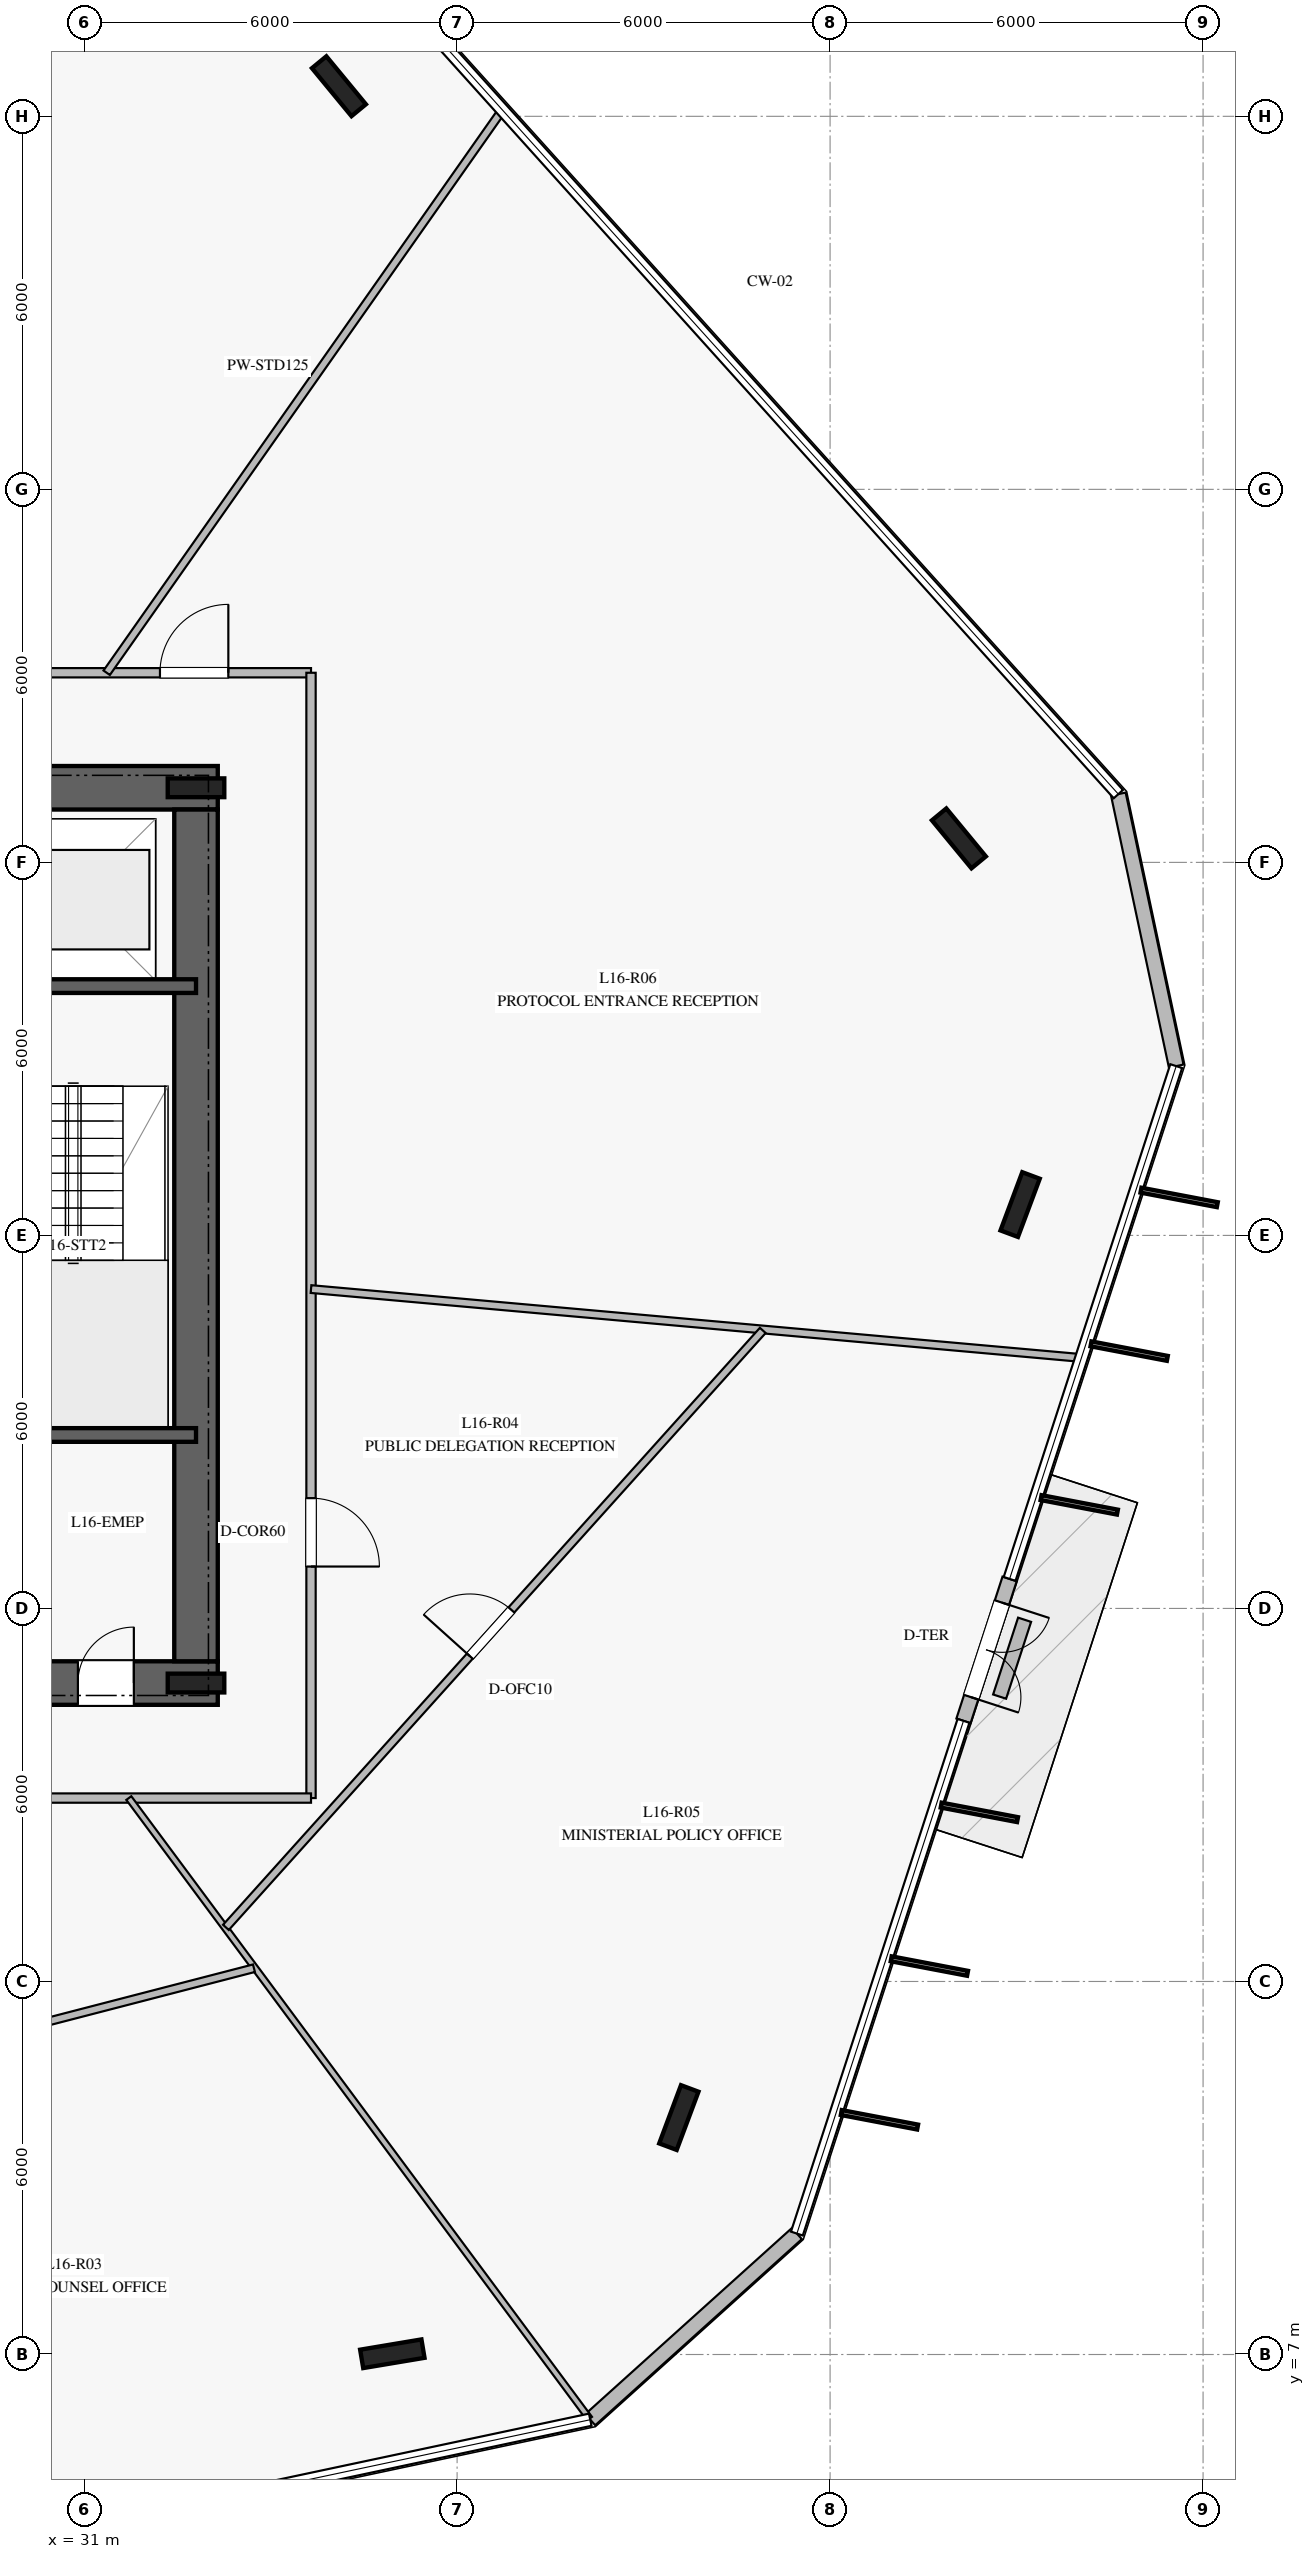
"""IFC4 building model, lengths in metres.
Left out: names, types, materials, properties, quantities, classifications, styles, units other than length and angle.
Written with IfcOpenShell. Run it as: python <this file> out.ifc"""

import sys

from ifc_helpers import new_model, si_unit, direction, frame, frame_2d, origin, origin_2d, place, context, subcontext, project, spatial, rectangle, i_section, extrude, element, fill, save


model = new_model("IFC4")
c1 = context("Model", 3, precision=1e-05, world=origin(), true_north=direction((0.0, 1.0)))
c2 = subcontext(c1, "Body", "Model", "MODEL_VIEW")
j1 = project(units=[si_unit("LENGTHUNIT", "METRE"), si_unit("PLANEANGLEUNIT", "RADIAN")], contexts=[c1])
p1 = place(None, origin())
s1 = spatial("IfcSite", under=j1, at=p1, CompositionType="ELEMENT")
p2 = place(p1, origin())
s2 = spatial("IfcBuilding", under=s1, at=p2, CompositionType="ELEMENT")
p3 = place(p2, frame((0.0, 0.0, 68.0)))
s3 = spatial("IfcBuildingStorey", under=s2, at=p3, CompositionType="ELEMENT", Elevation=68.0)
p4 = place(p3, frame((16.85, 17.8, 0.0), z_axis=(0.0, 0.0, 1.0), x_axis=(1.0, 0.0, 0.0)))
e1 = element("IfcWall", 1, at=p4, inside=s3, PredefinedType="SHEAR", context=c2, shape_type="SweptSolid", body=[
    extrude(rectangle(XDim=16.3, YDim=0.7, at=frame_2d((8.15, 0.0))), origin(), (0.0, 0.0, 1.0), 3.76),
])
p5 = place(p4, frame((5.1, 0.0, 0.0)))
e2 = element("IfcOpeningElement", 2, at=p5, cuts=e1, PredefinedType="OPENING", context=c2, shape_type="SweptSolid", body=[
    extrude(rectangle(XDim=1.2, YDim=2.25, at=frame_2d((0.6, 1.125))), frame((0.0, 0.36, 0.0), z_axis=(0.0, -1.0, 0.0), x_axis=(1.0, 0.0, 0.0)), (0.0, 0.0, 1.0), 0.72),
])
p6 = place(p4, frame((14.05, 0.0, 0.0)))
e3 = element("IfcOpeningElement", 3, at=p6, cuts=e1, PredefinedType="OPENING", context=c2, shape_type="SweptSolid", body=[
    extrude(rectangle(XDim=0.9, YDim=2.1, at=frame_2d((0.45, 1.05))), frame((0.0, 0.36, 0.0), z_axis=(0.0, -1.0, 0.0), x_axis=(1.0, 0.0, 0.0)), (0.0, 0.0, 1.0), 0.72),
])
p7 = place(p4, frame((7.95, 0.0, 0.0)))
e4 = element("IfcOpeningElement", 4, at=p7, cuts=e1, PredefinedType="OPENING", context=c2, shape_type="SweptSolid", body=[
    extrude(rectangle(XDim=1.1, YDim=2.2, at=frame_2d((0.55, 1.1))), frame((0.0, 0.36, 0.0), z_axis=(0.0, -1.0, 0.0), x_axis=(1.0, 0.0, 0.0)), (0.0, 0.0, 1.0), 0.72),
])
p8 = place(p4, frame((9.925, 0.0, 0.0)))
e5 = element("IfcOpeningElement", 5, at=p8, cuts=e1, PredefinedType="OPENING", context=c2, shape_type="SweptSolid", body=[
    extrude(rectangle(XDim=1.1, YDim=2.2, at=frame_2d((0.55, 1.1))), frame((0.0, 0.36, 0.0), z_axis=(0.0, -1.0, 0.0), x_axis=(1.0, 0.0, 0.0)), (0.0, 0.0, 1.0), 0.72),
])
p9 = place(p4, frame((11.9, 0.0, 0.0)))
e6 = element("IfcOpeningElement", 6, at=p9, cuts=e1, PredefinedType="OPENING", context=c2, shape_type="SweptSolid", body=[
    extrude(rectangle(XDim=1.1, YDim=2.2, at=frame_2d((0.55, 1.1))), frame((0.0, 0.36, 0.0), z_axis=(0.0, -1.0, 0.0), x_axis=(1.0, 0.0, 0.0)), (0.0, 0.0, 1.0), 0.72),
])
p10 = place(p3, frame((33.15, 32.2, 0.0), z_axis=(0.0, 0.0, 1.0), x_axis=(-1.0, 0.0, 0.0)))
e7 = element("IfcWall", 7, at=p10, inside=s3, PredefinedType="SHEAR", context=c2, shape_type="SweptSolid", body=[
    extrude(rectangle(XDim=16.3, YDim=0.7, at=frame_2d((8.15, 0.0))), origin(), (0.0, 0.0, 1.0), 3.76),
])
p11 = place(p10, frame((5.1, 0.0, 0.0)))
e8 = element("IfcOpeningElement", 8, at=p11, cuts=e7, PredefinedType="OPENING", context=c2, shape_type="SweptSolid", body=[
    extrude(rectangle(XDim=1.2, YDim=2.25, at=frame_2d((0.6, 1.125))), frame((0.0, 0.36, 0.0), z_axis=(0.0, -1.0, 0.0), x_axis=(1.0, 0.0, 0.0)), (0.0, 0.0, 1.0), 0.72),
])
p12 = place(p3, frame((32.8, 18.15, 0.0), z_axis=(0.0, 0.0, 1.0), x_axis=(0.0, 1.0, 0.0)))
e9 = element("IfcWall", 9, at=p12, inside=s3, PredefinedType="SHEAR", context=c2, shape_type="SweptSolid", body=[
    extrude(rectangle(XDim=13.7, YDim=0.7, at=frame_2d((6.85, 0.0))), origin(), (0.0, 0.0, 1.0), 3.76),
])
for number, where, z_axis, x_axis in (
    (10, (32.8, 17.8, 0.0), (0.0, 0.0, 1.0), (1.0, 0.0, 0.0)),
    (11, (32.8, 32.2, 0.0), (0.0, 0.0, 1.0), (1.0, 0.0, 0.0)),
):
    element("IfcColumn", number, at=place(p3, frame(where, z_axis=z_axis, x_axis=x_axis)), inside=s3, PredefinedType="COLUMN", context=c2, shape_type="SweptSolid", body=[
        extrude(i_section(OverallWidth=0.302, OverallDepth=0.91, WebThickness=0.021, FlangeThickness=0.04, at=origin_2d()), origin(), (0.0, 0.0, 1.0), 4.0),
    ])
for number, where, z_axis, x_axis in (
    (12, (29.08, 21.79, 0.0), (0.0, 0.0, 1.0), (1.0, 0.0, 0.0)),
    (13, (29.08, 29.01, 0.0), (0.0, 0.0, 1.0), (1.0, 0.0, 0.0)),
):
    element("IfcWall", number, at=place(p3, frame(where, z_axis=z_axis, x_axis=x_axis)), inside=s3, PredefinedType="SOLIDWALL", context=c2, shape_type="SweptSolid", body=[
        extrude(rectangle(XDim=3.72, YDim=0.22, at=frame_2d((1.86, 0.0))), origin(), (0.0, 0.0, 1.0), 3.76),
    ])
for number, where, z_axis, x_axis in (
    (14, (45.072, 31.386, 0.0), (0.0, 0.0, 1.0), (-0.636, 0.772, 0.0)),
    (15, (35.099, 43.484, 0.0), (0.0, 0.0, 1.0), (-0.636, 0.772, 0.0)),
    (16, (35.958, 7.012, 0.0), (0.0, 0.0, 1.0), (0.986, 0.165, 0.0)),
    (17, (40.567, 10.811, 0.0), (0.0, 0.0, 1.0), (0.35, 0.937, 0.0)),
    (18, (46.057, 25.496, 0.0), (0.0, 0.0, 1.0), (0.35, 0.937, 0.0)),
):
    element("IfcColumn", number, at=place(p3, frame(where, z_axis=z_axis, x_axis=x_axis)), inside=s3, PredefinedType="COLUMN", context=c2, shape_type="SweptSolid", body=[
        extrude(i_section(OverallWidth=0.3, OverallDepth=1.0, WebThickness=0.019, FlangeThickness=0.036, at=origin_2d()), origin(), (0.0, 0.0, 1.0), 4.0),
    ])
p13 = place(p3, frame((39.142, 5.951, 0.0), z_axis=(0.0, 0.0, 1.0), x_axis=(0.743009154356, 0.669281253692, 0.0)))
e19 = element("IfcWall", 19, at=p13, inside=s3, PredefinedType="STANDARD", context=c2, shape_type="SweptSolid", body=[
    extrude(rectangle(XDim=4.474, YDim=0.24, at=frame_2d((2.237, 0.0))), origin(), (0.0, 0.0, 1.0), 3.76),
])
p14 = place(p3, frame((45.146, 17.192, 0.0), z_axis=(0.0, 0.0, 1.0), x_axis=(0.309049280464, 0.951046025303, 0.0)))
e20 = element("IfcWall", 20, at=p14, inside=s3, PredefinedType="STANDARD", context=c2, shape_type="SweptSolid", body=[
    extrude(rectangle(XDim=2.401, YDim=0.24, at=frame_2d((1.2, 0.0))), origin(), (0.0, 0.0, 1.0), 3.76),
])
p15 = place(p14, frame((0.4, 0.0, 0.0)))
e21 = element("IfcOpeningElement", 21, at=p15, cuts=e20, PredefinedType="OPENING", context=c2, shape_type="SweptSolid", body=[
    extrude(rectangle(XDim=1.6, YDim=2.25, at=frame_2d((0.8, 1.125))), frame((0.0, 0.13, 0.0), z_axis=(0.0, -1.0, 0.0), x_axis=(1.0, 0.0, 0.0)), (0.0, 0.0, 1.0), 0.26),
])
p16 = place(p3, frame((48.568, 27.723, 0.0), z_axis=(0.0, 0.0, 1.0), x_axis=(-0.20817208226, 0.978092216597, 0.0)))
e22 = element("IfcWall", 22, at=p16, inside=s3, PredefinedType="STANDARD", context=c2, shape_type="SweptSolid", body=[
    extrude(rectangle(XDim=4.473, YDim=0.24, at=frame_2d((2.236, 0.0))), origin(), (0.0, 0.0, 1.0), 3.76),
])
p17 = place(p3, frame((45.727, 17.582, 0.0), z_axis=(0.0, 0.0, 1.0), x_axis=(0.309175263073, 0.951005077118, 0.0)))
e23 = element("IfcWall", 23, at=p17, inside=s3, PredefinedType="USERDEFINED", context=c2, shape_type="SweptSolid", body=[
    extrude(rectangle(XDim=1.3, YDim=0.22, at=frame_2d((0.65, 0.0))), origin(), (0.0, 0.0, 1.0), 0.4),
])
p18 = place(p3, frame((15.35, 34.05, 0.0), z_axis=(0.0, 0.0, 1.0), x_axis=(1.0, 0.0, 0.0)))
e24 = element("IfcWall", 24, at=p18, inside=s3, PredefinedType="PARTITIONING", context=c2, shape_type="SweptSolid", body=[
    extrude(rectangle(XDim=19.3, YDim=0.15, at=frame_2d((9.65, 0.0))), origin(), (0.0, 0.0, 1.0), 3.21),
])
p19 = place(p18, frame((16.87, 0.0, 0.0)))
e25 = element("IfcOpeningElement", 25, at=p19, cuts=e24, PredefinedType="OPENING", context=c2, shape_type="SweptSolid", body=[
    extrude(rectangle(XDim=1.1, YDim=2.2, at=frame_2d((0.55, 1.1))), frame((0.0, 0.085, 0.0), z_axis=(0.0, -1.0, 0.0), x_axis=(1.0, 0.0, 0.0)), (0.0, 0.0, 1.0), 0.17),
])
p20 = place(p18, frame((11.431, 0.0, 0.0)))
e26 = element("IfcOpeningElement", 26, at=p20, cuts=e24, PredefinedType="OPENING", context=c2, shape_type="SweptSolid", body=[
    extrude(rectangle(XDim=1.1, YDim=2.2, at=frame_2d((0.55, 1.1))), frame((0.0, 0.085, 0.0), z_axis=(0.0, -1.0, 0.0), x_axis=(1.0, 0.0, 0.0)), (0.0, 0.0, 1.0), 0.17),
])
p21 = place(p18, frame((3.579, 0.0, 0.0)))
e27 = element("IfcOpeningElement", 27, at=p21, cuts=e24, PredefinedType="OPENING", context=c2, shape_type="SweptSolid", body=[
    extrude(rectangle(XDim=1.1, YDim=2.2, at=frame_2d((0.55, 1.1))), frame((0.0, 0.085, 0.0), z_axis=(0.0, -1.0, 0.0), x_axis=(1.0, 0.0, 0.0)), (0.0, 0.0, 1.0), 0.17),
])
p22 = place(p3, frame((34.65, 34.05, 0.0), z_axis=(0.0, 0.0, 1.0), x_axis=(0.0, -1.0, 0.0)))
e28 = element("IfcWall", 28, at=p22, inside=s3, PredefinedType="PARTITIONING", context=c2, shape_type="SweptSolid", body=[
    extrude(rectangle(XDim=18.1, YDim=0.15, at=frame_2d((9.05, 0.0))), origin(), (0.0, 0.0, 1.0), 3.21),
])
p23 = place(p22, frame((13.276, 0.0, 0.0)))
e29 = element("IfcOpeningElement", 29, at=p23, cuts=e28, PredefinedType="OPENING", context=c2, shape_type="SweptSolid", body=[
    extrude(rectangle(XDim=1.1, YDim=2.2, at=frame_2d((0.55, 1.1))), frame((0.0, 0.085, 0.0), z_axis=(0.0, -1.0, 0.0), x_axis=(1.0, 0.0, 0.0)), (0.0, 0.0, 1.0), 0.17),
])
p24 = place(p3, frame((34.65, 15.95, 0.0), z_axis=(0.0, 0.0, 1.0), x_axis=(-1.0, 0.0, 0.0)))
e30 = element("IfcWall", 30, at=p24, inside=s3, PredefinedType="PARTITIONING", context=c2, shape_type="SweptSolid", body=[
    extrude(rectangle(XDim=19.3, YDim=0.15, at=frame_2d((9.65, 0.0))), origin(), (0.0, 0.0, 1.0), 3.21),
])
p25 = place(p24, frame((14.672, 0.0, 0.0)))
e31 = element("IfcOpeningElement", 31, at=p25, cuts=e30, PredefinedType="OPENING", context=c2, shape_type="SweptSolid", body=[
    extrude(rectangle(XDim=1.1, YDim=2.2, at=frame_2d((0.55, 1.1))), frame((0.0, 0.085, 0.0), z_axis=(0.0, -1.0, 0.0), x_axis=(1.0, 0.0, 0.0)), (0.0, 0.0, 1.0), 0.17),
])
p26 = place(p24, frame((6.728, 0.0, 0.0)))
e32 = element("IfcOpeningElement", 32, at=p26, cuts=e30, PredefinedType="OPENING", context=c2, shape_type="SweptSolid", body=[
    extrude(rectangle(XDim=1.1, YDim=2.2, at=frame_2d((0.55, 1.1))), frame((0.0, 0.085, 0.0), z_axis=(0.0, -1.0, 0.0), x_axis=(1.0, 0.0, 0.0)), (0.0, 0.0, 1.0), 0.17),
])
p27 = place(p3, frame((31.363, 34.05, 0.0), z_axis=(0.0, 0.0, 1.0), x_axis=(0.575191769802, 0.818018598782, 0.0)))
e33 = element("IfcWall", 33, at=p27, inside=s3, PredefinedType="PARTITIONING", context=c2, shape_type="SweptSolid", body=[
    extrude(rectangle(XDim=11.048, YDim=0.125, at=frame_2d((5.524, 0.0))), origin(), (0.0, 0.0, 1.0), 3.05),
])
p28 = place(p3, frame((31.719, 15.95, 0.0), z_axis=(0.0, 0.0, 1.0), x_axis=(0.596065473306, -0.802935832762, 0.0)))
e34 = element("IfcWall", 34, at=p28, inside=s3, PredefinedType="MOVABLE", context=c2, shape_type="SweptSolid", body=[
    extrude(rectangle(XDim=12.433, YDim=0.1, at=frame_2d((6.217, 0.0))), origin(), (0.0, 0.0, 1.0), 3.06),
])
p29 = place(p3, frame((34.65, 24.137, 0.0), z_axis=(0.0, 0.0, 1.0), x_axis=(0.996022646165, -0.089100439541, 0.0)))
e35 = element("IfcWall", 35, at=p29, inside=s3, PredefinedType="PARTITIONING", context=c2, shape_type="SweptSolid", body=[
    extrude(rectangle(XDim=12.423, YDim=0.125, at=frame_2d((6.212, 0.0))), origin(), (0.0, 0.0, 1.0), 3.06),
])
p30 = place(p3, frame((21.686, 10.093, 0.0), z_axis=(0.0, 0.0, 1.0), x_axis=(0.968058125552, 0.250725877309, 0.0)))
e36 = element("IfcWall", 36, at=p30, inside=s3, PredefinedType="PARTITIONING", context=c2, shape_type="SweptSolid", body=[
    extrude(rectangle(XDim=12.443, YDim=0.125, at=frame_2d((6.222, 0.0))), origin(), (0.0, 0.0, 1.0), 3.76),
])
p31 = place(p30, frame((5.722, 0.0, 0.0)))
e37 = element("IfcOpeningElement", 37, at=p31, cuts=e36, PredefinedType="OPENING", context=c2, shape_type="SweptSolid", body=[
    extrude(rectangle(XDim=1.0, YDim=2.15, at=frame_2d((0.5, 1.075))), frame((0.0, 0.073, 0.0), z_axis=(0.0, -1.0, 0.0), x_axis=(1.0, 0.0, 0.0)), (0.0, 0.0, 1.0), 0.145),
])
p32 = place(p3, frame((33.281, 13.87, 0.0), z_axis=(0.0, 0.0, 1.0), x_axis=(0.668723423756, 0.74351125245, 0.0)))
e38 = element("IfcWall", 38, at=p32, inside=s3, PredefinedType="PARTITIONING", context=c2, shape_type="SweptSolid", body=[
    extrude(rectangle(XDim=12.914, YDim=0.125, at=frame_2d((6.457, 0.0))), origin(), (0.0, 0.0, 1.0), 3.21),
])
p33 = place(p32, frame((5.868, 0.0, 0.0)))
e39 = element("IfcOpeningElement", 39, at=p33, cuts=e38, PredefinedType="OPENING", context=c2, shape_type="SweptSolid", body=[
    extrude(rectangle(XDim=1.0, YDim=2.15, at=frame_2d((0.5, 1.075))), frame((0.0, 0.073, 0.0), z_axis=(0.0, -1.0, 0.0), x_axis=(1.0, 0.0, 0.0)), (0.0, 0.0, 1.0), 0.145),
])
p34 = place(p15, frame((1.6, 0.0, 0.0), z_axis=(0.0, 0.0, 1.0), x_axis=(-1.0, 0.0, 0.0)))
e40 = element("IfcDoor", 40, at=p34, inside=s3, OperationType="DOUBLE_DOOR_SINGLE_SWING", PredefinedType="DOOR", context=c2, shape_type="SweptSolid", body=[
    extrude(rectangle(XDim=1.6, YDim=2.25, at=frame_2d((0.8, 1.125))), frame((0.0, 0.025, 0.0), z_axis=(0.0, -1.0, 0.0), x_axis=(1.0, 0.0, 0.0)), (0.0, 0.0, 1.0), 0.05),
])
fill(e21, e40)
p35 = place(p6, origin())
e41 = element("IfcDoor", 41, at=p35, inside=s3, OperationType="SINGLE_SWING_RIGHT", PredefinedType="DOOR", context=c2, shape_type="SweptSolid", body=[
    extrude(rectangle(XDim=0.9, YDim=2.1, at=frame_2d((0.45, 1.05))), frame((0.0, 0.025, 0.0), z_axis=(0.0, -1.0, 0.0), x_axis=(1.0, 0.0, 0.0)), (0.0, 0.0, 1.0), 0.05),
])
fill(e3, e41)
p36 = place(p23, origin())
e42 = element("IfcDoor", 42, at=p36, inside=s3, OperationType="SINGLE_SWING_RIGHT", PredefinedType="DOOR", context=c2, shape_type="SweptSolid", body=[
    extrude(rectangle(XDim=1.1, YDim=2.2, at=frame_2d((0.55, 1.1))), frame((0.0, 0.025, 0.0), z_axis=(0.0, -1.0, 0.0), x_axis=(1.0, 0.0, 0.0)), (0.0, 0.0, 1.0), 0.05),
])
fill(e29, e42)
p37 = place(p33, origin())
e43 = element("IfcDoor", 43, at=p37, inside=s3, OperationType="SINGLE_SWING_LEFT", PredefinedType="DOOR", context=c2, shape_type="SweptSolid", body=[
    extrude(rectangle(XDim=1.0, YDim=2.15, at=frame_2d((0.5, 1.075))), frame((0.0, 0.025, 0.0), z_axis=(0.0, -1.0, 0.0), x_axis=(1.0, 0.0, 0.0)), (0.0, 0.0, 1.0), 0.05),
])
fill(e39, e43)
p38 = place(p19, origin())
e44 = element("IfcDoor", 44, at=p38, inside=s3, OperationType="SINGLE_SWING_RIGHT", PredefinedType="DOOR", context=c2, shape_type="SweptSolid", body=[
    extrude(rectangle(XDim=1.1, YDim=2.2, at=frame_2d((0.55, 1.1))), frame((0.0, 0.025, 0.0), z_axis=(0.0, -1.0, 0.0), x_axis=(1.0, 0.0, 0.0)), (0.0, 0.0, 1.0), 0.05),
])
fill(e25, e44)
save(model, sys.argv[1])
